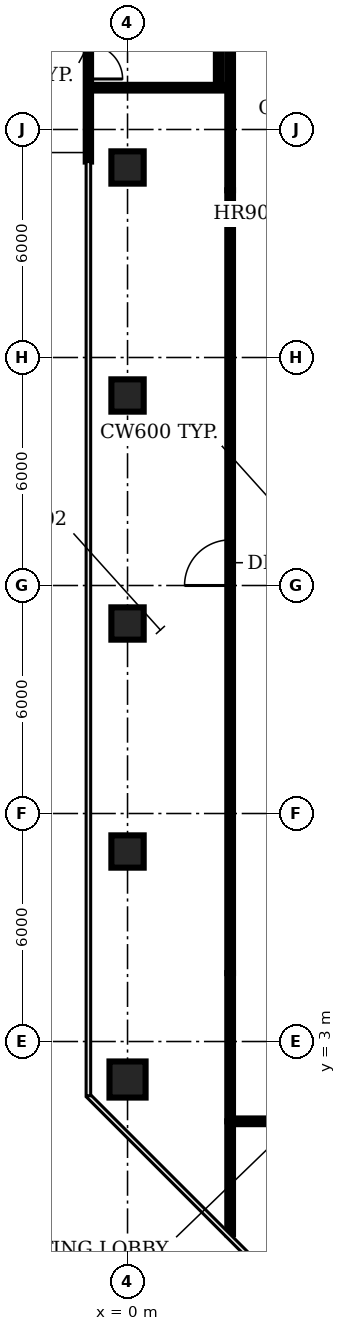
"""IFC4 building model, lengths in metres.
Left out: names, types, materials, properties, quantities, classifications, styles, units other than length and angle.
Written with IfcOpenShell. Run it as: python <this file> out.ifc"""

import sys

from ifc_helpers import new_model, si_unit, direction, frame, frame_2d, origin, origin_2d, place, context, subcontext, project, spatial, rectangle, circle, extrude, element, fill, save


model = new_model("IFC4")
c1 = context("Model", 3, precision=1e-05, world=origin(), true_north=direction((0.0, 1.0)))
c2 = subcontext(c1, "Body", "Model", "MODEL_VIEW")
j1 = project(units=[si_unit("LENGTHUNIT", "METRE"), si_unit("PLANEANGLEUNIT", "RADIAN")], contexts=[c1])
p1 = place(None, origin())
s1 = spatial("IfcSite", under=j1, at=p1, CompositionType="ELEMENT")
p2 = place(p1, origin())
s2 = spatial("IfcBuilding", under=s1, at=p2, CompositionType="ELEMENT")
p3 = place(p2, frame((0.0, 0.0, 180.2)))
s3 = spatial("IfcBuildingStorey", under=s2, at=p3, CompositionType="ELEMENT", Elevation=180.2)
p4 = place(p3, frame((0.0, 2.0, 0.0), z_axis=(0.0, 0.0, 1.0), x_axis=(1.0, 0.0, 0.0)))
e1 = element("IfcColumn", 1, at=p4, inside=s3, PredefinedType="COLUMN", context=c2, shape_type="SweptSolid", body=[
    extrude(circle(Radius=0.475, at=origin_2d()), origin(), (0.0, 0.0, 1.0), 3.85),
])
for number, where, z_axis, x_axis in (
    (2, (0.0, 8.0, 0.0), (0.0, 0.0, 1.0), (1.0, 0.0, 0.0)),
    (3, (0.0, 14.0, 0.0), (0.0, 0.0, 1.0), (1.0, 0.0, 0.0)),
    (4, (0.0, 20.0, 0.0), (0.0, 0.0, 1.0), (1.0, 0.0, 0.0)),
    (5, (0.0, 26.0, 0.0), (0.0, 0.0, 1.0), (1.0, 0.0, 0.0)),
):
    element("IfcColumn", number, at=place(p3, frame(where, z_axis=z_axis, x_axis=x_axis)), inside=s3, PredefinedType="COLUMN", context=c2, shape_type="SweptSolid", body=[
        extrude(rectangle(XDim=0.85, YDim=0.85, at=origin_2d()), origin(), (0.0, 0.0, 1.0), 3.85),
    ])
p5 = place(p3, frame((-1.03, 32.302, 0.0), z_axis=(0.0, 0.0, 1.0), x_axis=(0.0, -1.0, 0.0)))
e6 = element("IfcWall", 6, at=p5, inside=s3, PredefinedType="SOLIDWALL", context=c2, shape_type="SweptSolid", body=[
    extrude(rectangle(XDim=6.146, YDim=0.14, at=frame_2d((3.073, 0.0))), origin(), (0.0, 0.0, 1.0), 3.85),
])
p6 = place(p5, frame((2.173, 0.0, 0.0)))
e7 = element("IfcOpeningElement", 7, at=p6, cuts=e6, PredefinedType="OPENING", context=c2, shape_type="SweptSolid", body=[
    extrude(rectangle(XDim=1.8, YDim=2.4, at=frame_2d((0.9, 1.2))), frame((0.0, 0.08, 0.0), z_axis=(0.0, -1.0, 0.0), x_axis=(1.0, 0.0, 0.0)), (0.0, 0.0, 1.0), 0.16),
])
p7 = place(p3, frame((-0.97, 28.1, 0.0), z_axis=(0.0, 0.0, 1.0), x_axis=(1.0, 0.0, 0.0)))
e8 = element("IfcWall", 8, at=p7, inside=s3, PredefinedType="PARTITIONING", context=c2, shape_type="SweptSolid", body=[
    extrude(rectangle(XDim=3.67, YDim=0.15, at=frame_2d((1.835, 0.0))), origin(), (0.0, 0.0, 1.0), 2.88),
])
p8 = place(p3, frame((2.4, 28.1, 0.0), z_axis=(0.0, 0.0, 1.0), x_axis=(0.0, 1.0, 0.0)))
e9 = element("IfcWall", 9, at=p8, inside=s3, PredefinedType="PARTITIONING", context=c2, shape_type="SweptSolid", body=[
    extrude(rectangle(XDim=6.0, YDim=0.15, at=frame_2d((3.0, 0.0))), origin(), (0.0, 0.0, 1.0), 2.88),
])
p9 = place(p3, frame((2.7, -2.072, 0.0), z_axis=(0.0, 0.0, 1.0), x_axis=(0.0, 1.0, 0.0)))
e10 = element("IfcWall", 10, at=p9, inside=s3, PredefinedType="PARTITIONING", context=c2, shape_type="SweptSolid", body=[
    extrude(rectangle(XDim=2.972, YDim=0.15, at=frame_2d((1.486, 0.0))), origin(), (0.0, 0.0, 1.0), 2.88),
])
p10 = place(p3, frame((2.7, 0.9, 0.0), z_axis=(0.0, 0.0, 1.0), x_axis=(0.0, 1.0, 0.0)))
e11 = element("IfcWall", 11, at=p10, inside=s3, PredefinedType="PARTITIONING", context=c2, shape_type="SweptSolid", body=[
    extrude(rectangle(XDim=3.9, YDim=0.15, at=frame_2d((1.95, 0.0))), origin(), (0.0, 0.0, 1.0), 2.88),
])
p11 = place(p3, frame((2.7, 4.8, 0.0), z_axis=(0.0, 0.0, 1.0), x_axis=(0.0, 1.0, 0.0)))
e12 = element("IfcWall", 12, at=p11, inside=s3, PredefinedType="PARTITIONING", context=c2, shape_type="SweptSolid", body=[
    extrude(rectangle(XDim=20.6, YDim=0.15, at=frame_2d((10.3, 0.0))), origin(), (0.0, 0.0, 1.0), 2.88),
])
p12 = place(p11, frame((10.2, 0.0, 0.0)))
e13 = element("IfcOpeningElement", 13, at=p12, cuts=e12, PredefinedType="OPENING", context=c2, shape_type="SweptSolid", body=[
    extrude(rectangle(XDim=1.2, YDim=2.1, at=frame_2d((0.6, 1.05))), frame((0.0, 0.085, 0.0), z_axis=(0.0, -1.0, 0.0), x_axis=(1.0, 0.0, 0.0)), (0.0, 0.0, 1.0), 0.17),
])
p13 = place(p3, frame((2.7, 25.4, 0.0), z_axis=(0.0, 0.0, 1.0), x_axis=(0.0, 1.0, 0.0)))
e14 = element("IfcWall", 14, at=p13, inside=s3, PredefinedType="PARTITIONING", context=c2, shape_type="SweptSolid", body=[
    extrude(rectangle(XDim=3.9, YDim=0.15, at=frame_2d((1.95, 0.0))), origin(), (0.0, 0.0, 1.0), 2.88),
])
p14 = place(p3, frame((27.3, 0.9, 0.0), z_axis=(0.0, 0.0, 1.0), x_axis=(-1.0, 0.0, 0.0)))
e15 = element("IfcWall", 15, at=p14, inside=s3, PredefinedType="PARTITIONING", context=c2, shape_type="SweptSolid", body=[
    extrude(rectangle(XDim=24.6, YDim=0.15, at=frame_2d((12.3, 0.0))), origin(), (0.0, 0.0, 1.0), 2.88),
])
p15 = place(p14, frame((11.8, 0.0, 0.0)))
e16 = element("IfcOpeningElement", 16, at=p15, cuts=e15, PredefinedType="OPENING", context=c2, shape_type="SweptSolid", body=[
    extrude(rectangle(XDim=1.2, YDim=2.1, at=frame_2d((0.6, 1.05))), frame((0.0, 0.085, 0.0), z_axis=(0.0, -1.0, 0.0), x_axis=(1.0, 0.0, 0.0)), (0.0, 0.0, 1.0), 0.17),
])
p16 = place(p6, origin())
e17 = element("IfcDoor", 17, at=p16, inside=s3, OperationType="DOUBLE_DOOR_DOUBLE_SWING", PredefinedType="DOOR", context=c2, shape_type="SweptSolid", body=[
    extrude(rectangle(XDim=1.8, YDim=2.4, at=frame_2d((0.9, 1.2))), frame((0.0, 0.025, 0.0), z_axis=(0.0, -1.0, 0.0), x_axis=(1.0, 0.0, 0.0)), (0.0, 0.0, 1.0), 0.05),
])
fill(e7, e17)
p17 = place(p12, origin())
e18 = element("IfcDoor", 18, at=p17, inside=s3, OperationType="SINGLE_SWING_LEFT", PredefinedType="DOOR", context=c2, shape_type="SweptSolid", body=[
    extrude(rectangle(XDim=1.2, YDim=2.1, at=frame_2d((0.6, 1.05))), frame((0.0, 0.025, 0.0), z_axis=(0.0, -1.0, 0.0), x_axis=(1.0, 0.0, 0.0)), (0.0, 0.0, 1.0), 0.05),
])
fill(e13, e18)
save(model, sys.argv[1])
